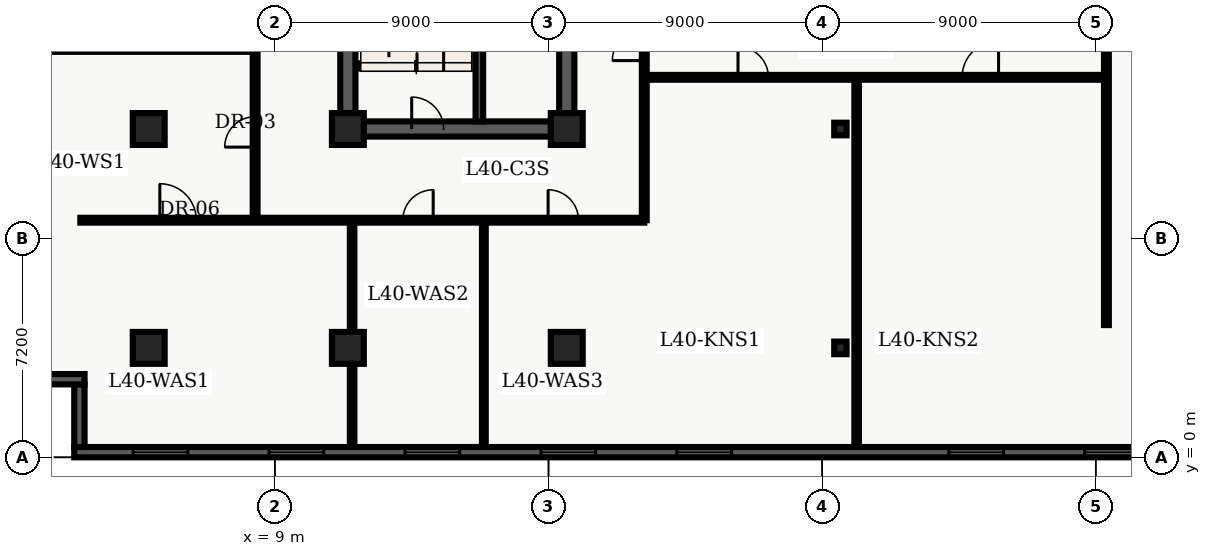
"""IFC4 building model, lengths in metres.
Left out: names, types, materials, properties, quantities, classifications, styles, units other than length and angle.
Written with IfcOpenShell. Run it as: python <this file> out.ifc"""

import sys

from ifc_helpers import new_model, entity, si_unit, converted_unit, direction, frame, origin_with_axes, origin_2d_with_axis, place, context, subcontext, project, spatial, polyline, rectangle, i_section, outline, extrude, element, fill, save


model = new_model("IFC4")
c1 = context("Model", 3, precision=1e-05, world=origin_with_axes(), true_north=direction((0.0, 1.0)))
c2 = subcontext(c1, "Body", "Model", "MODEL_VIEW")
j1 = project(units=[si_unit("LENGTHUNIT", "METRE"), converted_unit("PLANEANGLEUNIT", "DEGREE", entity("IfcPlaneAngleMeasure", 0.017), si_unit("PLANEANGLEUNIT", "RADIAN"), dimensions=[0, 0, 0, 0, 0, 0, 0])], contexts=[c1])
p1 = place(None, origin_with_axes())
s1 = spatial("IfcSite", under=j1, at=p1, CompositionType="ELEMENT")
p2 = place(p1, origin_with_axes())
s2 = spatial("IfcBuilding", under=s1, at=p2, CompositionType="ELEMENT")
p3 = place(p2, frame((0.0, 0.0, 164.1), z_axis=(0.0, 0.0, 1.0), x_axis=(1.0, 0.0, 0.0)))
s3 = spatial("IfcBuildingStorey", under=s2, at=p3, CompositionType="ELEMENT", Elevation=164.1)
p4 = place(p3, frame((11.4, 10.8, 0.0), z_axis=(0.0, 0.0, 1.0), x_axis=(0.0, 1.0, 0.0)))
e1 = element("IfcWall", 1, at=p4, inside=s3, PredefinedType="SHEAR", context=c2, shape_type="SweptSolid", body=[
    extrude(outline(polyline([(0.0, -0.25), (27.0, -0.25), (27.0, 0.25), (0.0, 0.25), (0.0, -0.25)])), origin_with_axes(), (0.0, 0.0, 1.0), 3.66),
])
p5 = place(p3, frame((11.4, 10.8, 0.0), z_axis=(0.0, 0.0, 1.0), x_axis=(1.0, 0.0, 0.0)))
e2 = element("IfcWall", 2, at=p5, inside=s3, PredefinedType="SHEAR", context=c2, shape_type="SweptSolid", body=[
    extrude(outline(polyline([(0.0, -0.25), (7.2, -0.25), (7.2, 0.25), (0.0, 0.25), (0.0, -0.25)])), origin_with_axes(), (0.0, 0.0, 1.0), 3.66),
])
p6 = place(p5, frame((2.625, 0.0, 0.0), z_axis=(0.0, 0.0, 1.0), x_axis=(1.0, 0.0, 0.0)))
e3 = element("IfcOpeningElement", 3, at=p6, cuts=e2, PredefinedType="OPENING", context=c2, shape_type="SweptSolid", body=[
    extrude(rectangle(XDim=1.05, YDim=0.52, at=origin_2d_with_axis()), origin_with_axes(), (0.0, 0.0, 1.0), 2.15),
])
p7 = place(p3, frame((18.6, 10.8, 0.0), z_axis=(0.0, 0.0, 1.0), x_axis=(0.0, 1.0, 0.0)))
e4 = element("IfcWall", 4, at=p7, inside=s3, PredefinedType="SHEAR", context=c2, shape_type="SweptSolid", body=[
    extrude(outline(polyline([(0.0, -0.25), (13.5, -0.25), (13.5, 0.25), (0.0, 0.25), (0.0, -0.25)])), origin_with_axes(), (0.0, 0.0, 1.0), 3.66),
])
p8 = place(p7, frame((11.125, 0.0, 0.0), z_axis=(0.0, 0.0, 1.0), x_axis=(1.0, 0.0, 0.0)))
e5 = element("IfcOpeningElement", 5, at=p8, cuts=e4, PredefinedType="OPENING", context=c2, shape_type="SweptSolid", body=[
    extrude(rectangle(XDim=1.05, YDim=0.52, at=origin_2d_with_axis()), origin_with_axes(), (0.0, 0.0, 1.0), 2.15),
])
p9 = place(p7, frame((4.325, 0.0, 0.0), z_axis=(0.0, 0.0, 1.0), x_axis=(1.0, 0.0, 0.0)))
e6 = element("IfcOpeningElement", 6, at=p9, cuts=e4, PredefinedType="OPENING", context=c2, shape_type="SweptSolid", body=[
    extrude(rectangle(XDim=1.05, YDim=0.52, at=origin_2d_with_axis()), origin_with_axes(), (0.0, 0.0, 1.0), 2.15),
])
p10 = place(p3, frame((15.725, 11.05, 0.0), z_axis=(0.0, 0.0, 1.0), x_axis=(0.0, 1.0, 0.0)))
e7 = element("IfcWall", 7, at=p10, inside=s3, PredefinedType="SHEAR", context=c2, shape_type="SweptSolid", body=[
    extrude(outline(polyline([(0.0, -0.125), (8.65, -0.125), (8.65, 0.125), (0.0, 0.125), (0.0, -0.125)])), origin_with_axes(), (0.0, 0.0, 1.0), 3.66),
])
for number, where, z_axis, x_axis in (
    (8, (11.4, 3.6, 0.0), (0.0, 0.0, 1.0), (1.0, 0.0, 0.0)),
    (9, (11.4, 10.8, 0.0), (0.0, 0.0, 1.0), (1.0, 0.0, 0.0)),
    (10, (18.6, 3.6, 0.0), (0.0, 0.0, 1.0), (1.0, 0.0, 0.0)),
    (11, (18.6, 10.8, 0.0), (0.0, 0.0, 1.0), (1.0, 0.0, 0.0)),
    (12, (4.85, 3.6, 0.0), (0.0, 0.0, 1.0), (1.0, 0.0, 0.0)),
    (13, (4.85, 10.8, 0.0), (0.0, 0.0, 1.0), (1.0, 0.0, 0.0)),
):
    element("IfcColumn", number, at=place(p3, frame(where, z_axis=z_axis, x_axis=x_axis)), inside=s3, PredefinedType="COLUMN", context=c2, shape_type="SweptSolid", body=[
        extrude(rectangle(XDim=1.05, YDim=1.05, at=origin_2d_with_axis()), origin_with_axes(), (0.0, 0.0, 1.0), 3.9),
    ])
for number, where, z_axis, x_axis in (
    (14, (27.6, 3.6, 0.0), (0.0, 0.0, 1.0), (1.0, 0.0, 0.0)),
    (15, (27.6, 10.8, 0.0), (0.0, 0.0, 1.0), (1.0, 0.0, 0.0)),
):
    element("IfcColumn", number, at=place(p3, frame(where, z_axis=z_axis, x_axis=x_axis)), inside=s3, PredefinedType="COLUMN", context=c2, shape_type="SweptSolid", body=[
        extrude(i_section(OverallWidth=0.406, OverallDepth=0.416, WebThickness=0.03, FlangeThickness=0.048, FilletRadius=0.022, at=origin_2d_with_axis()), origin_with_axes(), (0.0, 0.0, 1.0), 3.9),
    ])
p11 = place(p3, frame((2.6, 7.8, 0.0), z_axis=(0.0, 0.0, 1.0), x_axis=(1.0, 0.0, 0.0)))
e16 = element("IfcWall", 16, at=p11, inside=s3, PredefinedType="PARTITIONING", context=c2, shape_type="SweptSolid", body=[
    extrude(outline(polyline([(0.0, -0.08), (18.55, -0.08), (18.55, 0.08), (0.0, 0.08), (0.0, -0.08)])), origin_with_axes(), (0.0, 0.0, 1.0), 2.7),
])
p12 = place(p11, frame((3.215, 0.0, 0.0), z_axis=(0.0, 0.0, 1.0), x_axis=(1.0, 0.0, 0.0)))
e17 = element("IfcOpeningElement", 17, at=p12, cuts=e16, PredefinedType="OPENING", context=c2, shape_type="SweptSolid", body=[
    extrude(rectangle(XDim=1.2, YDim=0.18, at=origin_2d_with_axis()), origin_with_axes(), (0.0, 0.0, 1.0), 2.2),
])
p13 = place(p11, frame((11.107, 0.0, 0.0), z_axis=(0.0, 0.0, 1.0), x_axis=(1.0, 0.0, 0.0)))
e18 = element("IfcOpeningElement", 18, at=p13, cuts=e16, PredefinedType="OPENING", context=c2, shape_type="SweptSolid", body=[
    extrude(rectangle(XDim=1.0, YDim=0.18, at=origin_2d_with_axis()), origin_with_axes(), (0.0, 0.0, 1.0), 2.15),
])
p14 = place(p11, frame((15.886, 0.0, 0.0), z_axis=(0.0, 0.0, 1.0), x_axis=(1.0, 0.0, 0.0)))
e19 = element("IfcOpeningElement", 19, at=p14, cuts=e16, PredefinedType="OPENING", context=c2, shape_type="SweptSolid", body=[
    extrude(rectangle(XDim=1.0, YDim=0.18, at=origin_2d_with_axis()), origin_with_axes(), (0.0, 0.0, 1.0), 2.15),
])
p15 = place(p3, frame((21.15, 7.8, 0.0), z_axis=(0.0, 0.0, 1.0), x_axis=(0.0, 1.0, 0.0)))
e20 = element("IfcWall", 20, at=p15, inside=s3, PredefinedType="PARTITIONING", context=c2, shape_type="SweptSolid", body=[
    extrude(outline(polyline([(0.0, -0.08), (32.7, -0.08), (32.7, 0.08), (0.0, 0.08), (0.0, -0.08)])), origin_with_axes(), (0.0, 0.0, 1.0), 2.7),
])
p16 = place(p15, frame((5.775, 0.0, 0.0), z_axis=(0.0, 0.0, 1.0), x_axis=(1.0, 0.0, 0.0)))
e21 = element("IfcOpeningElement", 21, at=p16, cuts=e20, PredefinedType="OPENING", context=c2, shape_type="SweptSolid", body=[
    extrude(rectangle(XDim=1.05, YDim=0.18, at=origin_2d_with_axis()), origin_with_axes(), (0.0, 0.0, 1.0), 2.15),
])
p17 = place(p3, frame((8.35, 7.8, 0.0), z_axis=(0.0, 0.0, 1.0), x_axis=(0.0, 1.0, 0.0)))
e22 = element("IfcWall", 22, at=p17, inside=s3, PredefinedType="PARTITIONING", context=c2, shape_type="SweptSolid", body=[
    extrude(outline(polyline([(0.0, -0.08), (12.6, -0.08), (12.6, 0.08), (0.0, 0.08), (0.0, -0.08)])), origin_with_axes(), (0.0, 0.0, 1.0), 2.7),
])
p18 = place(p17, frame((2.904, 0.0, 0.0), z_axis=(0.0, 0.0, 1.0), x_axis=(1.0, 0.0, 0.0)))
e23 = element("IfcOpeningElement", 23, at=p18, cuts=e22, PredefinedType="OPENING", context=c2, shape_type="SweptSolid", body=[
    extrude(rectangle(XDim=1.0, YDim=0.18, at=origin_2d_with_axis()), origin_with_axes(), (0.0, 0.0, 1.0), 2.15),
])
p19 = place(p17, frame((9.099, 0.0, 0.0), z_axis=(0.0, 0.0, 1.0), x_axis=(1.0, 0.0, 0.0)))
e24 = element("IfcOpeningElement", 24, at=p19, cuts=e22, PredefinedType="OPENING", context=c2, shape_type="SweptSolid", body=[
    extrude(rectangle(XDim=1.0, YDim=0.18, at=origin_2d_with_axis()), origin_with_axes(), (0.0, 0.0, 1.0), 2.15),
])
p20 = place(p3, frame((0.335, 13.478, 0.0), z_axis=(0.0, 0.0, 1.0), x_axis=(1.0, 0.0, 0.0)))
e25 = element("IfcWall", 25, at=p20, inside=s3, PredefinedType="PARTITIONING", context=c2, shape_type="SweptSolid", body=[
    extrude(outline(polyline([(0.0, -0.14), (7.895, -0.14), (7.895, 0.14), (0.0, 0.14), (0.0, -0.14)])), origin_with_axes(), (0.0, 0.0, 1.0), 2.7),
])
p21 = place(p3, frame((11.54, 0.335, 0.0), z_axis=(0.0, 0.0, 1.0), x_axis=(0.0, 1.0, 0.0)))
e26 = element("IfcWall", 26, at=p21, inside=s3, PredefinedType="PARTITIONING", context=c2, shape_type="SweptSolid", body=[
    extrude(outline(polyline([(0.0, -0.075), (7.365, -0.075), (7.365, 0.075), (0.0, 0.075), (0.0, -0.075)])), origin_with_axes(), (0.0, 0.0, 1.0), 2.7),
])
p22 = place(p3, frame((15.873, 0.335, 0.0), z_axis=(0.0, 0.0, 1.0), x_axis=(0.0, 1.0, 0.0)))
e27 = element("IfcWall", 27, at=p22, inside=s3, PredefinedType="PARTITIONING", context=c2, shape_type="SweptSolid", body=[
    extrude(outline(polyline([(0.0, -0.062), (7.365, -0.062), (7.365, 0.062), (0.0, 0.062), (0.0, -0.062)])), origin_with_axes(), (0.0, 0.0, 1.0), 2.7),
])
p23 = place(p3, frame((21.15, 12.5, 0.0), z_axis=(0.0, 0.0, 1.0), x_axis=(1.0, 0.0, 0.0)))
e28 = element("IfcWall", 28, at=p23, inside=s3, PredefinedType="PARTITIONING", context=c2, shape_type="SweptSolid", body=[
    extrude(outline(polyline([(0.0, -0.08), (15.2, -0.08), (15.2, 0.08), (0.0, 0.08), (0.0, -0.08)])), origin_with_axes(), (0.0, 0.0, 1.0), 2.7),
])
p24 = place(p23, frame((3.583, 0.0, 0.0), z_axis=(0.0, 0.0, 1.0), x_axis=(1.0, 0.0, 0.0)))
e29 = element("IfcOpeningElement", 29, at=p24, cuts=e28, PredefinedType="OPENING", context=c2, shape_type="SweptSolid", body=[
    extrude(rectangle(XDim=1.0, YDim=0.18, at=origin_2d_with_axis()), origin_with_axes(), (0.0, 0.0, 1.0), 2.15),
])
p25 = place(p23, frame((11.053, 0.0, 0.0), z_axis=(0.0, 0.0, 1.0), x_axis=(1.0, 0.0, 0.0)))
e30 = element("IfcOpeningElement", 30, at=p25, cuts=e28, PredefinedType="OPENING", context=c2, shape_type="SweptSolid", body=[
    extrude(rectangle(XDim=1.2, YDim=0.18, at=origin_2d_with_axis()), origin_with_axes(), (0.0, 0.0, 1.0), 2.2),
])
p26 = place(p3, frame((36.35, 4.35, 0.0), z_axis=(0.0, 0.0, 1.0), x_axis=(0.0, 1.0, 0.0)))
e31 = element("IfcWall", 31, at=p26, inside=s3, PredefinedType="PARTITIONING", context=c2, shape_type="SweptSolid", body=[
    extrude(outline(polyline([(0.0, -0.08), (16.95, -0.08), (16.95, 0.08), (0.0, 0.08), (0.0, -0.08)])), origin_with_axes(), (0.0, 0.0, 1.0), 2.7),
])
p27 = place(p3, frame((28.135, 0.335, 0.0), z_axis=(0.0, 0.0, 1.0), x_axis=(0.0, 1.0, 0.0)))
e32 = element("IfcWall", 32, at=p27, inside=s3, PredefinedType="PARTITIONING", context=c2, shape_type="SweptSolid", body=[
    extrude(outline(polyline([(0.0, -0.075), (12.045, -0.075), (12.045, 0.075), (0.0, 0.075), (0.0, -0.075)])), origin_with_axes(), (0.0, 0.0, 1.0), 2.7),
])
p28 = place(p3, frame((57.26, 0.17, 0.0), z_axis=(0.0, 0.0, 1.0), x_axis=(-1.0, 0.0, 0.0)))
e33 = element("IfcWall", 33, at=p28, inside=s3, PredefinedType="SOLIDWALL", context=c2, shape_type="SweptSolid", body=[
    extrude(outline(polyline([(0.0, -0.17), (54.86, -0.17), (54.86, 0.17), (0.0, 0.17), (0.0, -0.17)])), origin_with_axes(), (0.0, 0.0, 1.0), 3.66),
])
p29 = place(p28, frame((2.836, 0.0, 0.45), z_axis=(0.0, 0.0, 1.0), x_axis=(1.0, 0.0, 0.0)))
e34 = element("IfcOpeningElement", 34, at=p29, cuts=e33, PredefinedType="OPENING", context=c2, shape_type="SweptSolid", body=[
    extrude(rectangle(XDim=1.8, YDim=0.36, at=origin_2d_with_axis()), origin_with_axes(), (0.0, 0.0, 1.0), 2.1),
])
p30 = place(p28, frame((7.307, 0.0, 0.45), z_axis=(0.0, 0.0, 1.0), x_axis=(1.0, 0.0, 0.0)))
e35 = element("IfcOpeningElement", 35, at=p30, cuts=e33, PredefinedType="OPENING", context=c2, shape_type="SweptSolid", body=[
    extrude(rectangle(XDim=1.8, YDim=0.36, at=origin_2d_with_axis()), origin_with_axes(), (0.0, 0.0, 1.0), 2.1),
])
p31 = place(p28, frame((11.779, 0.0, 0.45), z_axis=(0.0, 0.0, 1.0), x_axis=(1.0, 0.0, 0.0)))
e36 = element("IfcOpeningElement", 36, at=p31, cuts=e33, PredefinedType="OPENING", context=c2, shape_type="SweptSolid", body=[
    extrude(rectangle(XDim=1.8, YDim=0.36, at=origin_2d_with_axis()), origin_with_axes(), (0.0, 0.0, 1.0), 2.1),
])
p32 = place(p28, frame((16.251, 0.0, 0.45), z_axis=(0.0, 0.0, 1.0), x_axis=(1.0, 0.0, 0.0)))
e37 = element("IfcOpeningElement", 37, at=p32, cuts=e33, PredefinedType="OPENING", context=c2, shape_type="SweptSolid", body=[
    extrude(rectangle(XDim=1.8, YDim=0.36, at=origin_2d_with_axis()), origin_with_axes(), (0.0, 0.0, 1.0), 2.1),
])
p33 = place(p28, frame((20.723, 0.0, 0.45), z_axis=(0.0, 0.0, 1.0), x_axis=(1.0, 0.0, 0.0)))
e38 = element("IfcOpeningElement", 38, at=p33, cuts=e33, PredefinedType="OPENING", context=c2, shape_type="SweptSolid", body=[
    extrude(rectangle(XDim=1.8, YDim=0.36, at=origin_2d_with_axis()), origin_with_axes(), (0.0, 0.0, 1.0), 2.1),
])
p34 = place(p28, frame((25.194, 0.0, 0.45), z_axis=(0.0, 0.0, 1.0), x_axis=(1.0, 0.0, 0.0)))
e39 = element("IfcOpeningElement", 39, at=p34, cuts=e33, PredefinedType="OPENING", context=c2, shape_type="SweptSolid", body=[
    extrude(rectangle(XDim=1.8, YDim=0.36, at=origin_2d_with_axis()), origin_with_axes(), (0.0, 0.0, 1.0), 2.1),
])
p35 = place(p28, frame((34.138, 0.0, 0.45), z_axis=(0.0, 0.0, 1.0), x_axis=(1.0, 0.0, 0.0)))
e40 = element("IfcOpeningElement", 40, at=p35, cuts=e33, PredefinedType="OPENING", context=c2, shape_type="SweptSolid", body=[
    extrude(rectangle(XDim=1.8, YDim=0.36, at=origin_2d_with_axis()), origin_with_axes(), (0.0, 0.0, 1.0), 2.1),
])
p36 = place(p28, frame((38.609, 0.0, 0.45), z_axis=(0.0, 0.0, 1.0), x_axis=(1.0, 0.0, 0.0)))
e41 = element("IfcOpeningElement", 41, at=p36, cuts=e33, PredefinedType="OPENING", context=c2, shape_type="SweptSolid", body=[
    extrude(rectangle(XDim=1.8, YDim=0.36, at=origin_2d_with_axis()), origin_with_axes(), (0.0, 0.0, 1.0), 2.1),
])
p37 = place(p28, frame((43.081, 0.0, 0.45), z_axis=(0.0, 0.0, 1.0), x_axis=(1.0, 0.0, 0.0)))
e42 = element("IfcOpeningElement", 42, at=p37, cuts=e33, PredefinedType="OPENING", context=c2, shape_type="SweptSolid", body=[
    extrude(rectangle(XDim=1.8, YDim=0.36, at=origin_2d_with_axis()), origin_with_axes(), (0.0, 0.0, 1.0), 2.1),
])
p38 = place(p28, frame((47.553, 0.0, 0.45), z_axis=(0.0, 0.0, 1.0), x_axis=(1.0, 0.0, 0.0)))
e43 = element("IfcOpeningElement", 43, at=p38, cuts=e33, PredefinedType="OPENING", context=c2, shape_type="SweptSolid", body=[
    extrude(rectangle(XDim=1.8, YDim=0.36, at=origin_2d_with_axis()), origin_with_axes(), (0.0, 0.0, 1.0), 2.1),
])
p39 = place(p28, frame((52.024, 0.0, 0.45), z_axis=(0.0, 0.0, 1.0), x_axis=(1.0, 0.0, 0.0)))
e44 = element("IfcOpeningElement", 44, at=p39, cuts=e33, PredefinedType="OPENING", context=c2, shape_type="SweptSolid", body=[
    extrude(rectangle(XDim=1.8, YDim=0.36, at=origin_2d_with_axis()), origin_with_axes(), (0.0, 0.0, 1.0), 2.1),
])
p40 = place(p3, frame((2.57, 0.34, 0.0), z_axis=(0.0, 0.0, 1.0), x_axis=(0.0, 1.0, 0.0)))
e45 = element("IfcWall", 45, at=p40, inside=s3, PredefinedType="SOLIDWALL", context=c2, shape_type="SweptSolid", body=[
    extrude(outline(polyline([(0.0, -0.17), (2.06, -0.17), (2.06, 0.17), (0.0, 0.17), (0.0, -0.17)])), origin_with_axes(), (0.0, 0.0, 1.0), 3.66),
])
p41 = place(p3, frame((2.74, 2.57, 0.0), z_axis=(0.0, 0.0, 1.0), x_axis=(-1.0, 0.0, 0.0)))
e46 = element("IfcWall", 46, at=p41, inside=s3, PredefinedType="SOLIDWALL", context=c2, shape_type="SweptSolid", body=[
    extrude(outline(polyline([(0.0, -0.17), (2.74, -0.17), (2.74, 0.17), (0.0, 0.17), (0.0, -0.17)])), origin_with_axes(), (0.0, 0.0, 1.0), 3.66),
])
p42 = place(p5, frame((2.625, 0.0, 0.0), z_axis=(0.0, 0.0, 1.0), x_axis=(1.0, 0.0, 0.0)))
e47 = element("IfcDoor", 47, at=p42, inside=s3, OperationType="SINGLE_SWING_LEFT", PredefinedType="DOOR", context=c2, shape_type="SweptSolid", body=[
    extrude(rectangle(XDim=1.05, YDim=0.09, at=origin_2d_with_axis()), origin_with_axes(), (0.0, 0.0, 1.0), 2.15),
])
fill(e3, e47)
p43 = place(p17, frame((2.904, 0.0, 0.0), z_axis=(0.0, 0.0, 1.0), x_axis=(1.0, 0.0, 0.0)))
e48 = element("IfcDoor", 48, at=p43, inside=s3, OperationType="SINGLE_SWING_LEFT", PredefinedType="DOOR", context=c2, shape_type="SweptSolid", body=[
    extrude(rectangle(XDim=1.0, YDim=0.09, at=origin_2d_with_axis()), origin_with_axes(), (0.0, 0.0, 1.0), 2.15),
])
fill(e23, e48)
p44 = place(p11, frame((3.215, 0.0, 0.0), z_axis=(0.0, 0.0, 1.0), x_axis=(1.0, 0.0, 0.0)))
e49 = element("IfcDoor", 49, at=p44, inside=s3, OperationType="SINGLE_SWING_LEFT", PredefinedType="DOOR", context=c2, shape_type="SweptSolid", body=[
    extrude(rectangle(XDim=1.2, YDim=0.09, at=origin_2d_with_axis()), origin_with_axes(), (0.0, 0.0, 1.0), 2.2),
])
fill(e17, e49)
p45 = place(p11, frame((11.107, 0.0, 0.0), z_axis=(0.0, 0.0, 1.0), x_axis=(1.0, 0.0, 0.0)))
e50 = element("IfcDoor", 50, at=p45, inside=s3, OperationType="SINGLE_SWING_RIGHT", PredefinedType="DOOR", context=c2, shape_type="SweptSolid", body=[
    extrude(rectangle(XDim=1.0, YDim=0.09, at=origin_2d_with_axis()), origin_with_axes(), (0.0, 0.0, 1.0), 2.15),
])
fill(e18, e50)
p46 = place(p11, frame((15.886, 0.0, 0.0), z_axis=(0.0, 0.0, 1.0), x_axis=(1.0, 0.0, 0.0)))
e51 = element("IfcDoor", 51, at=p46, inside=s3, OperationType="SINGLE_SWING_LEFT", PredefinedType="DOOR", context=c2, shape_type="SweptSolid", body=[
    extrude(rectangle(XDim=1.0, YDim=0.09, at=origin_2d_with_axis()), origin_with_axes(), (0.0, 0.0, 1.0), 2.15),
])
fill(e19, e51)
p47 = place(p15, frame((5.775, 0.0, 0.0), z_axis=(0.0, 0.0, 1.0), x_axis=(1.0, 0.0, 0.0)))
e52 = element("IfcDoor", 52, at=p47, inside=s3, OperationType="SINGLE_SWING_LEFT", PredefinedType="DOOR", context=c2, shape_type="SweptSolid", body=[
    extrude(rectangle(XDim=1.05, YDim=0.09, at=origin_2d_with_axis()), origin_with_axes(), (0.0, 0.0, 1.0), 2.15),
])
fill(e21, e52)
p48 = place(p23, frame((3.583, 0.0, 0.0), z_axis=(0.0, 0.0, 1.0), x_axis=(1.0, 0.0, 0.0)))
e53 = element("IfcDoor", 53, at=p48, inside=s3, OperationType="SINGLE_SWING_LEFT", PredefinedType="DOOR", context=c2, shape_type="SweptSolid", body=[
    extrude(rectangle(XDim=1.0, YDim=0.09, at=origin_2d_with_axis()), origin_with_axes(), (0.0, 0.0, 1.0), 2.15),
])
fill(e29, e53)
p49 = place(p23, frame((11.053, 0.0, 0.0), z_axis=(0.0, 0.0, 1.0), x_axis=(1.0, 0.0, 0.0)))
e54 = element("IfcDoor", 54, at=p49, inside=s3, OperationType="SINGLE_SWING_RIGHT", PredefinedType="DOOR", context=c2, shape_type="SweptSolid", body=[
    extrude(rectangle(XDim=1.2, YDim=0.09, at=origin_2d_with_axis()), origin_with_axes(), (0.0, 0.0, 1.0), 2.2),
])
fill(e30, e54)
p50 = place(p28, frame((20.723, 0.0, 0.45), z_axis=(0.0, 0.0, 1.0), x_axis=(1.0, 0.0, 0.0)))
e55 = element("IfcWindow", 55, at=p50, inside=s3, PredefinedType="WINDOW", context=c2, shape_type="SweptSolid", body=[
    extrude(rectangle(XDim=1.8, YDim=0.09, at=origin_2d_with_axis()), origin_with_axes(), (0.0, 0.0, 1.0), 2.1),
])
fill(e38, e55)
p51 = place(p28, frame((25.194, 0.0, 0.45), z_axis=(0.0, 0.0, 1.0), x_axis=(1.0, 0.0, 0.0)))
e56 = element("IfcWindow", 56, at=p51, inside=s3, PredefinedType="WINDOW", context=c2, shape_type="SweptSolid", body=[
    extrude(rectangle(XDim=1.8, YDim=0.09, at=origin_2d_with_axis()), origin_with_axes(), (0.0, 0.0, 1.0), 2.1),
])
fill(e39, e56)
p52 = place(p28, frame((34.138, 0.0, 0.45), z_axis=(0.0, 0.0, 1.0), x_axis=(1.0, 0.0, 0.0)))
e57 = element("IfcWindow", 57, at=p52, inside=s3, PredefinedType="WINDOW", context=c2, shape_type="SweptSolid", body=[
    extrude(rectangle(XDim=1.8, YDim=0.09, at=origin_2d_with_axis()), origin_with_axes(), (0.0, 0.0, 1.0), 2.1),
])
fill(e40, e57)
p53 = place(p28, frame((38.609, 0.0, 0.45), z_axis=(0.0, 0.0, 1.0), x_axis=(1.0, 0.0, 0.0)))
e58 = element("IfcWindow", 58, at=p53, inside=s3, PredefinedType="WINDOW", context=c2, shape_type="SweptSolid", body=[
    extrude(rectangle(XDim=1.8, YDim=0.09, at=origin_2d_with_axis()), origin_with_axes(), (0.0, 0.0, 1.0), 2.1),
])
fill(e41, e58)
p54 = place(p28, frame((43.081, 0.0, 0.45), z_axis=(0.0, 0.0, 1.0), x_axis=(1.0, 0.0, 0.0)))
e59 = element("IfcWindow", 59, at=p54, inside=s3, PredefinedType="WINDOW", context=c2, shape_type="SweptSolid", body=[
    extrude(rectangle(XDim=1.8, YDim=0.09, at=origin_2d_with_axis()), origin_with_axes(), (0.0, 0.0, 1.0), 2.1),
])
fill(e42, e59)
p55 = place(p28, frame((47.553, 0.0, 0.45), z_axis=(0.0, 0.0, 1.0), x_axis=(1.0, 0.0, 0.0)))
e60 = element("IfcWindow", 60, at=p55, inside=s3, PredefinedType="WINDOW", context=c2, shape_type="SweptSolid", body=[
    extrude(rectangle(XDim=1.8, YDim=0.09, at=origin_2d_with_axis()), origin_with_axes(), (0.0, 0.0, 1.0), 2.1),
])
fill(e43, e60)
p56 = place(p28, frame((52.024, 0.0, 0.45), z_axis=(0.0, 0.0, 1.0), x_axis=(1.0, 0.0, 0.0)))
e61 = element("IfcWindow", 61, at=p56, inside=s3, PredefinedType="WINDOW", context=c2, shape_type="SweptSolid", body=[
    extrude(rectangle(XDim=1.8, YDim=0.09, at=origin_2d_with_axis()), origin_with_axes(), (0.0, 0.0, 1.0), 2.1),
])
fill(e44, e61)
save(model, sys.argv[1])
